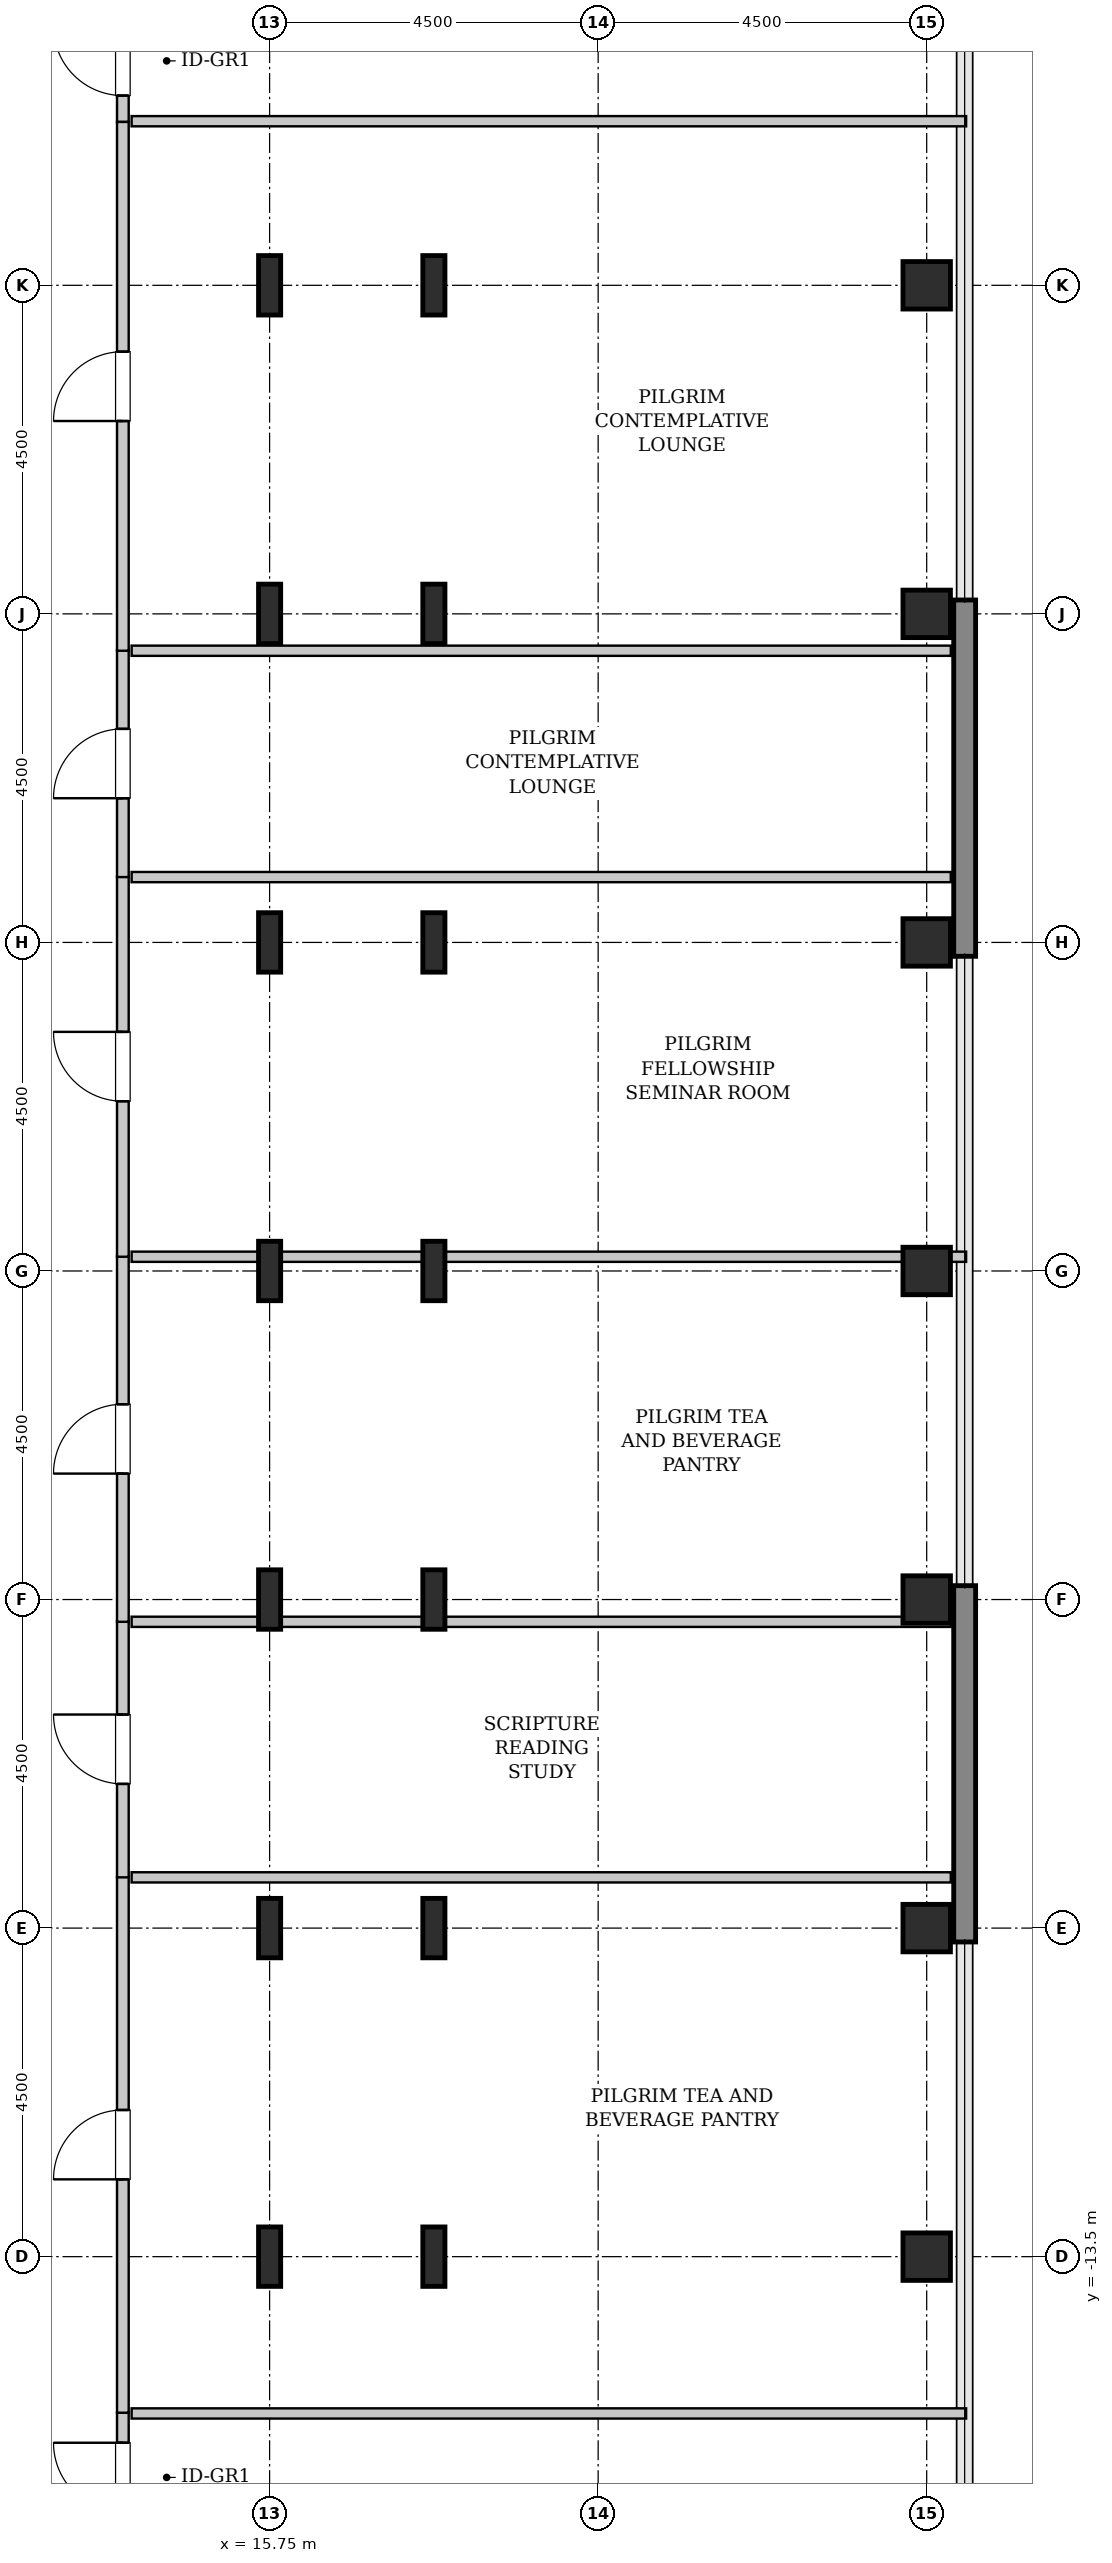
"""IFC4 building model, lengths in metres.
Left out: names, types, materials, properties, quantities, classifications, styles, units other than length and angle.
Written with IfcOpenShell. Run it as: python <this file> out.ifc"""

import sys

from ifc_helpers import new_model, si_unit, direction, frame, frame_2d, origin, origin_2d, place, context, subcontext, project, spatial, rectangle, hollow_rectangle, i_section, extrude, source, transform, mapped, element, fill, save


model = new_model("IFC4")
c1 = context("Model", 3, precision=1e-05, world=origin(), true_north=direction((0.0, 1.0)))
c2 = subcontext(c1, "Body", "Model", "MODEL_VIEW")
j1 = project(units=[si_unit("LENGTHUNIT", "METRE"), si_unit("PLANEANGLEUNIT", "RADIAN")], contexts=[c1])
p1 = place(None, origin())
s1 = spatial("IfcSite", under=j1, at=p1, CompositionType="ELEMENT")
p2 = place(p1, origin())
s2 = spatial("IfcBuilding", under=s1, at=p2, CompositionType="ELEMENT")
p3 = place(p2, frame((0.0, 0.0, 240.8)))
s3 = spatial("IfcBuildingStorey", under=s2, at=p3, CompositionType="ELEMENT", Elevation=240.8)
m1 = source(origin(), c2, "Body", "SweptSolid", [
    extrude(i_section(OverallWidth=0.303, OverallDepth=0.814, WebThickness=0.021, FlangeThickness=0.04, FilletRadius=0.03, at=origin_2d()), origin(), (0.0, 0.0, 1.0), 3.8),
])
for number, where, z_axis, x_axis in (
    (1, (15.75, -13.5, 0.0), (0.0, 0.0, 1.0), (1.0, 0.0, 0.0)),
    (2, (15.75, -9.0, 0.0), (0.0, 0.0, 1.0), (1.0, 0.0, 0.0)),
    (3, (15.75, -4.5, 0.0), (0.0, 0.0, 1.0), (1.0, 0.0, 0.0)),
    (4, (15.75, 0.0, 0.0), (0.0, 0.0, 1.0), (1.0, 0.0, 0.0)),
    (5, (15.75, 4.5, 0.0), (0.0, 0.0, 1.0), (1.0, 0.0, 0.0)),
    (6, (15.75, 9.0, 0.0), (0.0, 0.0, 1.0), (1.0, 0.0, 0.0)),
    (7, (15.75, 13.5, 0.0), (0.0, 0.0, 1.0), (1.0, 0.0, 0.0)),
    (8, (18.0, -13.5, 0.0), (0.0, 0.0, 1.0), (1.0, 0.0, 0.0)),
    (9, (18.0, -9.0, 0.0), (0.0, 0.0, 1.0), (1.0, 0.0, 0.0)),
    (10, (18.0, -4.5, 0.0), (0.0, 0.0, 1.0), (1.0, 0.0, 0.0)),
    (11, (18.0, 0.0, 0.0), (0.0, 0.0, 1.0), (1.0, 0.0, 0.0)),
    (12, (18.0, 4.5, 0.0), (0.0, 0.0, 1.0), (1.0, 0.0, 0.0)),
    (13, (18.0, 9.0, 0.0), (0.0, 0.0, 1.0), (1.0, 0.0, 0.0)),
    (14, (18.0, 13.5, 0.0), (0.0, 0.0, 1.0), (1.0, 0.0, 0.0)),
):
    element("IfcColumn", number, at=place(p3, frame(where, z_axis=z_axis, x_axis=x_axis)), inside=s3, PredefinedType="COLUMN", context=c2, shape_type="MappedRepresentation", body=[
        mapped(m1, transform((0.0, 0.0, 0.0), x_axis=(1.0, 0.0, 0.0), y_axis=(0.0, 1.0, 0.0), z_axis=(0.0, 0.0, 1.0), scale=1.0)),
    ])
m2 = source(origin(), c2, "Body", "SweptSolid", [
    extrude(hollow_rectangle(XDim=0.65, YDim=0.65, WallThickness=0.032, InnerFilletRadius=0.032, OuterFilletRadius=0.064, at=origin_2d()), origin(), (0.0, 0.0, 1.0), 3.8),
])
for number, where, z_axis, x_axis in (
    (15, (24.75, -13.5, 0.0), (0.0, 0.0, 1.0), (1.0, 0.0, 0.0)),
    (16, (24.75, -9.0, 0.0), (0.0, 0.0, 1.0), (1.0, 0.0, 0.0)),
    (17, (24.75, -4.5, 0.0), (0.0, 0.0, 1.0), (1.0, 0.0, 0.0)),
    (18, (24.75, 0.0, 0.0), (0.0, 0.0, 1.0), (1.0, 0.0, 0.0)),
    (19, (24.75, 4.5, 0.0), (0.0, 0.0, 1.0), (1.0, 0.0, 0.0)),
    (20, (24.75, 9.0, 0.0), (0.0, 0.0, 1.0), (1.0, 0.0, 0.0)),
    (21, (24.75, 13.5, 0.0), (0.0, 0.0, 1.0), (1.0, 0.0, 0.0)),
):
    element("IfcColumn", number, at=place(p3, frame(where, z_axis=z_axis, x_axis=x_axis)), inside=s3, PredefinedType="COLUMN", context=c2, shape_type="MappedRepresentation", body=[
        mapped(m2, transform((0.0, 0.0, 0.0), x_axis=(1.0, 0.0, 0.0), y_axis=(0.0, 1.0, 0.0), z_axis=(0.0, 0.0, 1.0), scale=1.0)),
    ])
m3 = source(origin(), c2, "Body", "SweptSolid", [
    extrude(rectangle(XDim=4.88, YDim=0.3, at=frame_2d((2.44, 0.0))), origin(), (0.0, 0.0, 1.0), 3.55),
])
for number, where, z_axis, x_axis in (
    (22, (25.27, -9.19, 0.0), (0.0, 0.0, 1.0), (0.0, 1.0, 0.0)),
    (23, (25.27, 4.31, 0.0), (0.0, 0.0, 1.0), (0.0, 1.0, 0.0)),
):
    element("IfcWall", number, at=place(p3, frame(where, z_axis=z_axis, x_axis=x_axis)), inside=s3, PredefinedType="SHEAR", context=c2, shape_type="MappedRepresentation", body=[
        mapped(m3, transform((0.0, 0.0, 0.0), x_axis=(1.0, 0.0, 0.0), y_axis=(0.0, 1.0, 0.0), z_axis=(0.0, 0.0, 1.0), scale=1.0)),
    ])
m4 = source(origin(), c2, "Body", "SweptSolid", [
    extrude(rectangle(XDim=7.403, YDim=0.16, at=frame_2d((3.701, 0.0))), origin(), (0.0, 0.0, 1.0), 3.535),
])
p4 = place(p3, frame((13.74, -23.04, 0.0), z_axis=(0.0, 0.0, 1.0), x_axis=(0.0, 1.0, 0.0)))
e24 = element("IfcWall", 24, at=p4, inside=s3, PredefinedType="PARTITIONING", context=c2, shape_type="MappedRepresentation", body=[
    mapped(m4, transform((0.0, 0.0, 0.0), x_axis=(1.0, 0.0, 0.0), y_axis=(0.0, 1.0, 0.0), z_axis=(0.0, 0.0, 1.0), scale=1.0)),
])
p5 = place(p4, frame((6.041, 0.0, 0.0)))
e25 = element("IfcOpeningElement", 25, at=p5, cuts=e24, PredefinedType="OPENING", context=c2, shape_type="SweptSolid", body=[
    extrude(rectangle(XDim=0.95, YDim=2.1, at=frame_2d((0.475, 1.05))), frame((0.0, 0.09, 0.0), z_axis=(0.0, -1.0, 0.0), x_axis=(1.0, 0.0, 0.0)), (0.0, 0.0, 1.0), 0.18),
])
m5 = source(origin(), c2, "Body", "SweptSolid", [
    extrude(rectangle(XDim=11.43, YDim=0.14, at=frame_2d((5.715, 0.0))), origin(), (0.0, 0.0, 1.0), 3.535),
])
p6 = place(p3, frame((13.86, -15.647, 0.0), z_axis=(0.0, 0.0, 1.0), x_axis=(1.0, 0.0, 0.0)))
e26 = element("IfcWall", 26, at=p6, inside=s3, PredefinedType="PARTITIONING", context=c2, shape_type="MappedRepresentation", body=[
    mapped(m5, transform((0.0, 0.0, 0.0), x_axis=(1.0, 0.0, 0.0), y_axis=(0.0, 1.0, 0.0), z_axis=(0.0, 0.0, 1.0), scale=1.0)),
])
m6 = source(origin(), c2, "Body", "SweptSolid", [
    extrude(rectangle(XDim=7.343, YDim=0.16, at=frame_2d((3.671, 0.0))), origin(), (0.0, 0.0, 1.0), 3.535),
])
p7 = place(p3, frame((13.74, -15.637, 0.0), z_axis=(0.0, 0.0, 1.0), x_axis=(0.0, 1.0, 0.0)))
e27 = element("IfcWall", 27, at=p7, inside=s3, PredefinedType="PARTITIONING", context=c2, shape_type="MappedRepresentation", body=[
    mapped(m6, transform((0.0, 0.0, 0.0), x_axis=(1.0, 0.0, 0.0), y_axis=(0.0, 1.0, 0.0), z_axis=(0.0, 0.0, 1.0), scale=1.0)),
])
p8 = place(p7, frame((3.196, 0.0, 0.0)))
e28 = element("IfcOpeningElement", 28, at=p8, cuts=e27, PredefinedType="OPENING", context=c2, shape_type="SweptSolid", body=[
    extrude(rectangle(XDim=0.95, YDim=2.1, at=frame_2d((0.475, 1.05))), frame((0.0, 0.09, 0.0), z_axis=(0.0, -1.0, 0.0), x_axis=(1.0, 0.0, 0.0)), (0.0, 0.0, 1.0), 0.18),
])
m7 = source(origin(), c2, "Body", "SweptSolid", [
    extrude(rectangle(XDim=11.22, YDim=0.14, at=frame_2d((5.61, 0.0))), origin(), (0.0, 0.0, 1.0), 3.535),
])
p9 = place(p3, frame((13.86, -8.305, 0.0), z_axis=(0.0, 0.0, 1.0), x_axis=(1.0, 0.0, 0.0)))
e29 = element("IfcWall", 29, at=p9, inside=s3, PredefinedType="PARTITIONING", context=c2, shape_type="MappedRepresentation", body=[
    mapped(m7, transform((0.0, 0.0, 0.0), x_axis=(1.0, 0.0, 0.0), y_axis=(0.0, 1.0, 0.0), z_axis=(0.0, 0.0, 1.0), scale=1.0)),
])
m8 = source(origin(), c2, "Body", "SweptSolid", [
    extrude(rectangle(XDim=3.51, YDim=0.16, at=frame_2d((1.755, 0.0))), origin(), (0.0, 0.0, 1.0), 3.535),
])
p10 = place(p3, frame((13.74, -8.305, 0.0), z_axis=(0.0, 0.0, 1.0), x_axis=(0.0, 1.0, 0.0)))
e30 = element("IfcWall", 30, at=p10, inside=s3, PredefinedType="PARTITIONING", context=c2, shape_type="MappedRepresentation", body=[
    mapped(m8, transform((0.0, 0.0, 0.0), x_axis=(1.0, 0.0, 0.0), y_axis=(0.0, 1.0, 0.0), z_axis=(0.0, 0.0, 1.0), scale=1.0)),
])
p11 = place(p10, frame((1.28, 0.0, 0.0)))
e31 = element("IfcOpeningElement", 31, at=p11, cuts=e30, PredefinedType="OPENING", context=c2, shape_type="SweptSolid", body=[
    extrude(rectangle(XDim=0.95, YDim=2.1, at=frame_2d((0.475, 1.05))), frame((0.0, 0.09, 0.0), z_axis=(0.0, -1.0, 0.0), x_axis=(1.0, 0.0, 0.0)), (0.0, 0.0, 1.0), 0.18),
])
m9 = source(origin(), c2, "Body", "SweptSolid", [
    extrude(rectangle(XDim=11.22, YDim=0.14, at=frame_2d((5.61, 0.0))), origin(), (0.0, 0.0, 1.0), 2.925),
])
p12 = place(p3, frame((13.86, -4.805, 0.0), z_axis=(0.0, 0.0, 1.0), x_axis=(1.0, 0.0, 0.0)))
e32 = element("IfcWall", 32, at=p12, inside=s3, PredefinedType="PARTITIONING", context=c2, shape_type="MappedRepresentation", body=[
    mapped(m9, transform((0.0, 0.0, 0.0), x_axis=(1.0, 0.0, 0.0), y_axis=(0.0, 1.0, 0.0), z_axis=(0.0, 0.0, 1.0), scale=1.0)),
])
m10 = source(origin(), c2, "Body", "SweptSolid", [
    extrude(rectangle(XDim=5.01, YDim=0.16, at=frame_2d((2.505, 0.0))), origin(), (0.0, 0.0, 1.0), 3.535),
])
p13 = place(p3, frame((13.74, -4.805, 0.0), z_axis=(0.0, 0.0, 1.0), x_axis=(0.0, 1.0, 0.0)))
e33 = element("IfcWall", 33, at=p13, inside=s3, PredefinedType="PARTITIONING", context=c2, shape_type="MappedRepresentation", body=[
    mapped(m10, transform((0.0, 0.0, 0.0), x_axis=(1.0, 0.0, 0.0), y_axis=(0.0, 1.0, 0.0), z_axis=(0.0, 0.0, 1.0), scale=1.0)),
])
p14 = place(p13, frame((2.03, 0.0, 0.0)))
e34 = element("IfcOpeningElement", 34, at=p14, cuts=e33, PredefinedType="OPENING", context=c2, shape_type="SweptSolid", body=[
    extrude(rectangle(XDim=0.95, YDim=2.1, at=frame_2d((0.475, 1.05))), frame((0.0, 0.09, 0.0), z_axis=(0.0, -1.0, 0.0), x_axis=(1.0, 0.0, 0.0)), (0.0, 0.0, 1.0), 0.18),
])
m11 = source(origin(), c2, "Body", "SweptSolid", [
    extrude(rectangle(XDim=11.43, YDim=0.14, at=frame_2d((5.715, 0.0))), origin(), (0.0, 0.0, 1.0), 2.925),
])
p15 = place(p3, frame((13.86, 0.195, 0.0), z_axis=(0.0, 0.0, 1.0), x_axis=(1.0, 0.0, 0.0)))
e35 = element("IfcWall", 35, at=p15, inside=s3, PredefinedType="PARTITIONING", context=c2, shape_type="MappedRepresentation", body=[
    mapped(m11, transform((0.0, 0.0, 0.0), x_axis=(1.0, 0.0, 0.0), y_axis=(0.0, 1.0, 0.0), z_axis=(0.0, 0.0, 1.0), scale=1.0)),
])
m12 = source(origin(), c2, "Body", "SweptSolid", [
    extrude(rectangle(XDim=5.21, YDim=0.16, at=frame_2d((2.605, 0.0))), origin(), (0.0, 0.0, 1.0), 3.535),
])
p16 = place(p3, frame((13.74, 0.195, 0.0), z_axis=(0.0, 0.0, 1.0), x_axis=(0.0, 1.0, 0.0)))
e36 = element("IfcWall", 36, at=p16, inside=s3, PredefinedType="PARTITIONING", context=c2, shape_type="MappedRepresentation", body=[
    mapped(m12, transform((0.0, 0.0, 0.0), x_axis=(1.0, 0.0, 0.0), y_axis=(0.0, 1.0, 0.0), z_axis=(0.0, 0.0, 1.0), scale=1.0)),
])
p17 = place(p16, frame((2.13, 0.0, 0.0)))
e37 = element("IfcOpeningElement", 37, at=p17, cuts=e36, PredefinedType="OPENING", context=c2, shape_type="SweptSolid", body=[
    extrude(rectangle(XDim=0.95, YDim=2.1, at=frame_2d((0.475, 1.05))), frame((0.0, 0.09, 0.0), z_axis=(0.0, -1.0, 0.0), x_axis=(1.0, 0.0, 0.0)), (0.0, 0.0, 1.0), 0.18),
])
p18 = place(p3, frame((13.86, 5.395, 0.0), z_axis=(0.0, 0.0, 1.0), x_axis=(1.0, 0.0, 0.0)))
e38 = element("IfcWall", 38, at=p18, inside=s3, PredefinedType="PARTITIONING", context=c2, shape_type="MappedRepresentation", body=[
    mapped(m7, transform((0.0, 0.0, 0.0), x_axis=(1.0, 0.0, 0.0), y_axis=(0.0, 1.0, 0.0), z_axis=(0.0, 0.0, 1.0), scale=1.0)),
])
m13 = source(origin(), c2, "Body", "SweptSolid", [
    extrude(rectangle(XDim=3.11, YDim=0.16, at=frame_2d((1.555, 0.0))), origin(), (0.0, 0.0, 1.0), 3.535),
])
p19 = place(p3, frame((13.74, 5.395, 0.0), z_axis=(0.0, 0.0, 1.0), x_axis=(0.0, 1.0, 0.0)))
e39 = element("IfcWall", 39, at=p19, inside=s3, PredefinedType="PARTITIONING", context=c2, shape_type="MappedRepresentation", body=[
    mapped(m13, transform((0.0, 0.0, 0.0), x_axis=(1.0, 0.0, 0.0), y_axis=(0.0, 1.0, 0.0), z_axis=(0.0, 0.0, 1.0), scale=1.0)),
])
p20 = place(p19, frame((1.08, 0.0, 0.0)))
e40 = element("IfcOpeningElement", 40, at=p20, cuts=e39, PredefinedType="OPENING", context=c2, shape_type="SweptSolid", body=[
    extrude(rectangle(XDim=0.95, YDim=2.1, at=frame_2d((0.475, 1.05))), frame((0.0, 0.09, 0.0), z_axis=(0.0, -1.0, 0.0), x_axis=(1.0, 0.0, 0.0)), (0.0, 0.0, 1.0), 0.18),
])
p21 = place(p3, frame((13.86, 8.495, 0.0), z_axis=(0.0, 0.0, 1.0), x_axis=(1.0, 0.0, 0.0)))
e41 = element("IfcWall", 41, at=p21, inside=s3, PredefinedType="PARTITIONING", context=c2, shape_type="MappedRepresentation", body=[
    mapped(m9, transform((0.0, 0.0, 0.0), x_axis=(1.0, 0.0, 0.0), y_axis=(0.0, 1.0, 0.0), z_axis=(0.0, 0.0, 1.0), scale=1.0)),
])
m14 = source(origin(), c2, "Body", "SweptSolid", [
    extrude(rectangle(XDim=7.302, YDim=0.16, at=frame_2d((3.651, 0.0))), origin(), (0.0, 0.0, 1.0), 3.535),
])
p22 = place(p3, frame((13.74, 15.738, 0.0), z_axis=(0.0, 0.0, 1.0), x_axis=(0.0, 1.0, 0.0)))
e42 = element("IfcWall", 42, at=p22, inside=s3, PredefinedType="PARTITIONING", context=c2, shape_type="MappedRepresentation", body=[
    mapped(m14, transform((0.0, 0.0, 0.0), x_axis=(1.0, 0.0, 0.0), y_axis=(0.0, 1.0, 0.0), z_axis=(0.0, 0.0, 1.0), scale=1.0)),
])
p23 = place(p22, frame((0.361, 0.0, 0.0)))
e43 = element("IfcOpeningElement", 43, at=p23, cuts=e42, PredefinedType="OPENING", context=c2, shape_type="SweptSolid", body=[
    extrude(rectangle(XDim=0.95, YDim=2.1, at=frame_2d((0.475, 1.05))), frame((0.0, 0.09, 0.0), z_axis=(0.0, -1.0, 0.0), x_axis=(1.0, 0.0, 0.0)), (0.0, 0.0, 1.0), 0.18),
])
p24 = place(p3, frame((13.86, 15.748, 0.0), z_axis=(0.0, 0.0, 1.0), x_axis=(1.0, 0.0, 0.0)))
e44 = element("IfcWall", 44, at=p24, inside=s3, PredefinedType="PARTITIONING", context=c2, shape_type="MappedRepresentation", body=[
    mapped(m5, transform((0.0, 0.0, 0.0), x_axis=(1.0, 0.0, 0.0), y_axis=(0.0, 1.0, 0.0), z_axis=(0.0, 0.0, 1.0), scale=1.0)),
])
m15 = source(origin(), c2, "Body", "SweptSolid", [
    extrude(rectangle(XDim=7.242, YDim=0.16, at=frame_2d((3.621, 0.0))), origin(), (0.0, 0.0, 1.0), 3.535),
])
p25 = place(p3, frame((13.74, 8.495, 0.0), z_axis=(0.0, 0.0, 1.0), x_axis=(0.0, 1.0, 0.0)))
e45 = element("IfcWall", 45, at=p25, inside=s3, PredefinedType="PARTITIONING", context=c2, shape_type="MappedRepresentation", body=[
    mapped(m15, transform((0.0, 0.0, 0.0), x_axis=(1.0, 0.0, 0.0), y_axis=(0.0, 1.0, 0.0), z_axis=(0.0, 0.0, 1.0), scale=1.0)),
])
p26 = place(p25, frame((3.146, 0.0, 0.0)))
e46 = element("IfcOpeningElement", 46, at=p26, cuts=e45, PredefinedType="OPENING", context=c2, shape_type="SweptSolid", body=[
    extrude(rectangle(XDim=0.95, YDim=2.1, at=frame_2d((0.475, 1.05))), frame((0.0, 0.09, 0.0), z_axis=(0.0, -1.0, 0.0), x_axis=(1.0, 0.0, 0.0)), (0.0, 0.0, 1.0), 0.18),
])
m16 = source(origin(), c2, "Body", "SweptSolid", [
    extrude(rectangle(XDim=0.95, YDim=2.1, at=frame_2d((0.475, 1.05))), frame((0.0, 0.025, 0.0), z_axis=(0.0, -1.0, 0.0), x_axis=(1.0, 0.0, 0.0)), (0.0, 0.0, 1.0), 0.05),
])
p27 = place(p5, origin())
e47 = element("IfcDoor", 47, at=p27, inside=s3, OperationType="SINGLE_SWING_RIGHT", PredefinedType="DOOR", context=c2, shape_type="MappedRepresentation", body=[
    mapped(m16, transform((0.0, 0.0, 0.0), x_axis=(1.0, 0.0, 0.0), y_axis=(0.0, 1.0, 0.0), z_axis=(0.0, 0.0, 1.0), scale=1.0)),
])
fill(e25, e47)
p28 = place(p8, origin())
e48 = element("IfcDoor", 48, at=p28, inside=s3, OperationType="SINGLE_SWING_LEFT", PredefinedType="DOOR", context=c2, shape_type="MappedRepresentation", body=[
    mapped(m16, transform((0.0, 0.0, 0.0), x_axis=(1.0, 0.0, 0.0), y_axis=(0.0, 1.0, 0.0), z_axis=(0.0, 0.0, 1.0), scale=1.0)),
])
fill(e28, e48)
p29 = place(p11, origin())
e49 = element("IfcDoor", 49, at=p29, inside=s3, OperationType="SINGLE_SWING_RIGHT", PredefinedType="DOOR", context=c2, shape_type="MappedRepresentation", body=[
    mapped(m16, transform((0.0, 0.0, 0.0), x_axis=(1.0, 0.0, 0.0), y_axis=(0.0, 1.0, 0.0), z_axis=(0.0, 0.0, 1.0), scale=1.0)),
])
fill(e31, e49)
p30 = place(p14, origin())
e50 = element("IfcDoor", 50, at=p30, inside=s3, OperationType="SINGLE_SWING_LEFT", PredefinedType="DOOR", context=c2, shape_type="MappedRepresentation", body=[
    mapped(m16, transform((0.0, 0.0, 0.0), x_axis=(1.0, 0.0, 0.0), y_axis=(0.0, 1.0, 0.0), z_axis=(0.0, 0.0, 1.0), scale=1.0)),
])
fill(e34, e50)
p31 = place(p17, origin())
e51 = element("IfcDoor", 51, at=p31, inside=s3, OperationType="SINGLE_SWING_RIGHT", PredefinedType="DOOR", context=c2, shape_type="MappedRepresentation", body=[
    mapped(m16, transform((0.0, 0.0, 0.0), x_axis=(1.0, 0.0, 0.0), y_axis=(0.0, 1.0, 0.0), z_axis=(0.0, 0.0, 1.0), scale=1.0)),
])
fill(e37, e51)
p32 = place(p20, origin())
e52 = element("IfcDoor", 52, at=p32, inside=s3, OperationType="SINGLE_SWING_LEFT", PredefinedType="DOOR", context=c2, shape_type="MappedRepresentation", body=[
    mapped(m16, transform((0.0, 0.0, 0.0), x_axis=(1.0, 0.0, 0.0), y_axis=(0.0, 1.0, 0.0), z_axis=(0.0, 0.0, 1.0), scale=1.0)),
])
fill(e40, e52)
p33 = place(p23, origin())
e53 = element("IfcDoor", 53, at=p33, inside=s3, OperationType="SINGLE_SWING_RIGHT", PredefinedType="DOOR", context=c2, shape_type="MappedRepresentation", body=[
    mapped(m16, transform((0.0, 0.0, 0.0), x_axis=(1.0, 0.0, 0.0), y_axis=(0.0, 1.0, 0.0), z_axis=(0.0, 0.0, 1.0), scale=1.0)),
])
fill(e43, e53)
p34 = place(p26, origin())
e54 = element("IfcDoor", 54, at=p34, inside=s3, OperationType="SINGLE_SWING_LEFT", PredefinedType="DOOR", context=c2, shape_type="MappedRepresentation", body=[
    mapped(m16, transform((0.0, 0.0, 0.0), x_axis=(1.0, 0.0, 0.0), y_axis=(0.0, 1.0, 0.0), z_axis=(0.0, 0.0, 1.0), scale=1.0)),
])
fill(e46, e54)
save(model, sys.argv[1])
